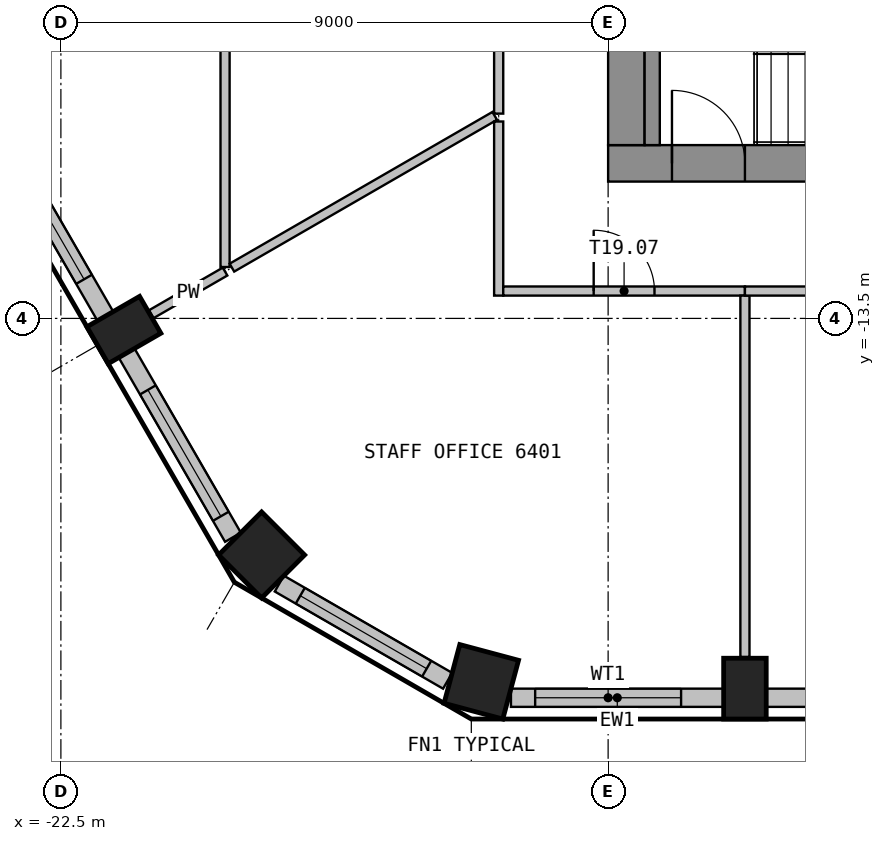
"""IFC4 building model, lengths in metres.
Left out: names, types, materials, properties, quantities, classifications, styles, units other than length and angle.
Written with IfcOpenShell. Run it as: python <this file> out.ifc"""

import sys

from ifc_helpers import new_model, si_unit, direction, frame, frame_2d, origin, origin_2d, place, context, subcontext, project, spatial, rectangle, extrude, element, fill, save


model = new_model("IFC4")
c1 = context("Model", 3, precision=1e-05, world=origin(), true_north=direction((0.0, 1.0)))
c2 = subcontext(c1, "Body", "Model", "MODEL_VIEW")
j1 = project(units=[si_unit("LENGTHUNIT", "METRE"), si_unit("PLANEANGLEUNIT", "RADIAN")], contexts=[c1])
p1 = place(None, origin())
s1 = spatial("IfcSite", under=j1, at=p1, CompositionType="ELEMENT")
p2 = place(p1, origin())
s2 = spatial("IfcBuilding", under=s1, at=p2, CompositionType="ELEMENT")
p3 = place(p2, frame((0.0, 0.0, 258.6)))
s3 = spatial("IfcBuildingStorey", under=s2, at=p3, CompositionType="ELEMENT", Elevation=258.6)
p4 = place(p3, frame((-15.586, -19.476, 0.0), z_axis=(0.0, 0.0, 1.0), x_axis=(0.965925826289, -0.258819045103, 0.0)))
e1 = element("IfcColumn", 1, at=p4, inside=s3, PredefinedType="COLUMN", context=c2, shape_type="SweptSolid", body=[
    extrude(rectangle(XDim=1.0, YDim=1.0, at=origin_2d()), origin(), (0.0, 0.0, 1.0), 3.575),
])
for number, where, z_axis, x_axis in (
    (2, (-11.25, -19.588, 0.0), (0.0, 0.0, 1.0), (1.0, 0.0, 0.0)),
    (3, (-21.464, -13.691, 0.0), (0.0, 0.0, 1.0), (0.5, -0.866, 0.0)),
):
    element("IfcColumn", number, at=place(p3, frame(where, z_axis=z_axis, x_axis=x_axis)), inside=s3, PredefinedType="COLUMN", context=c2, shape_type="SweptSolid", body=[
        extrude(rectangle(XDim=0.7, YDim=1.0, at=origin_2d()), origin(), (0.0, 0.0, 1.0), 3.575),
    ])
p5 = place(p3, frame((-19.199, -17.39, 0.0), z_axis=(0.0, 0.0, 1.0), x_axis=(0.707106781187, -0.707106781187, 0.0)))
e4 = element("IfcColumn", 4, at=p5, inside=s3, PredefinedType="COLUMN", context=c2, shape_type="SweptSolid", body=[
    extrude(rectangle(XDim=1.0, YDim=1.0, at=origin_2d()), origin(), (0.0, 0.0, 1.0), 3.575),
])
p6 = place(p3, frame((-15.098, -19.739, 0.0), z_axis=(0.0, 0.0, 1.0), x_axis=(1.0, 0.0, 0.0)))
e5 = element("IfcWall", 5, at=p6, inside=s3, PredefinedType="SOLIDWALL", context=c2, shape_type="SweptSolid", body=[
    extrude(rectangle(XDim=3.498, YDim=0.3, at=frame_2d((1.749, 0.0))), origin(), (0.0, 0.0, 1.0), 3.575),
])
p7 = place(p6, frame((0.398, 0.0, 0.9)))
e6 = element("IfcOpeningElement", 6, at=p7, cuts=e5, PredefinedType="OPENING", context=c2, shape_type="SweptSolid", body=[
    extrude(rectangle(XDim=2.4, YDim=2.1, at=frame_2d((1.2, 1.05))), frame((0.0, 0.16, 0.0), z_axis=(0.0, -1.0, 0.0), x_axis=(1.0, 0.0, 0.0)), (0.0, 0.0, 1.0), 0.32),
])
p8 = place(p3, frame((-10.899, -19.739, 0.0), z_axis=(0.0, 0.0, 1.0), x_axis=(1.0, 0.0, 0.0)))
e7 = element("IfcWall", 7, at=p8, inside=s3, PredefinedType="SOLIDWALL", context=c2, shape_type="SweptSolid", body=[
    extrude(rectangle(XDim=3.799, YDim=0.3, at=frame_2d((1.899, 0.0))), origin(), (0.0, 0.0, 1.0), 3.575),
])
p9 = place(p8, frame((0.699, 0.0, 0.9)))
e8 = element("IfcOpeningElement", 8, at=p9, cuts=e7, PredefinedType="OPENING", context=c2, shape_type="SweptSolid", body=[
    extrude(rectangle(XDim=2.4, YDim=2.1, at=frame_2d((1.2, 1.05))), frame((0.0, 0.16, 0.0), z_axis=(0.0, -1.0, 0.0), x_axis=(1.0, 0.0, 0.0)), (0.0, 0.0, 1.0), 0.32),
])
p10 = place(p3, frame((-23.669, -10.173, 0.0), z_axis=(0.0, 0.0, 1.0), x_axis=(0.499982058975, -0.866035761792, 0.0)))
e9 = element("IfcWall", 9, at=p10, inside=s3, PredefinedType="SOLIDWALL", context=c2, shape_type="SweptSolid", body=[
    extrude(rectangle(XDim=3.799, YDim=0.3, at=frame_2d((1.899, 0.0))), origin(), (0.0, 0.0, 1.0), 3.575),
])
p11 = place(p10, frame((0.699, 0.0, 0.9)))
e10 = element("IfcOpeningElement", 10, at=p11, cuts=e9, PredefinedType="OPENING", context=c2, shape_type="SweptSolid", body=[
    extrude(rectangle(XDim=2.4, YDim=2.1, at=frame_2d((1.2, 1.05))), frame((0.0, 0.16, 0.0), z_axis=(0.0, -1.0, 0.0), x_axis=(1.0, 0.0, 0.0)), (0.0, 0.0, 1.0), 0.32),
])
p12 = place(p3, frame((-21.419, -14.07, 0.0), z_axis=(0.0, 0.0, 1.0), x_axis=(0.499960102815, -0.866048437209, 0.0)))
e11 = element("IfcWall", 11, at=p12, inside=s3, PredefinedType="SOLIDWALL", context=c2, shape_type="SweptSolid", body=[
    extrude(rectangle(XDim=3.498, YDim=0.3, at=frame_2d((1.749, 0.0))), origin(), (0.0, 0.0, 1.0), 3.575),
])
p13 = place(p12, frame((0.699, 0.0, 0.9)))
e12 = element("IfcOpeningElement", 12, at=p13, cuts=e11, PredefinedType="OPENING", context=c2, shape_type="SweptSolid", body=[
    extrude(rectangle(XDim=2.4, YDim=2.1, at=frame_2d((1.2, 1.05))), frame((0.0, 0.16, 0.0), z_axis=(0.0, -1.0, 0.0), x_axis=(1.0, 0.0, 0.0)), (0.0, 0.0, 1.0), 0.32),
])
p14 = place(p3, frame((-18.908, -17.861, 0.0), z_axis=(0.0, 0.0, 1.0), x_axis=(0.866025316205, -0.500000151692, 0.0)))
e13 = element("IfcWall", 13, at=p14, inside=s3, PredefinedType="SOLIDWALL", context=c2, shape_type="SweptSolid", body=[
    extrude(rectangle(XDim=3.196, YDim=0.3, at=frame_2d((1.598, 0.0))), origin(), (0.0, 0.0, 1.0), 3.575),
])
p15 = place(p14, frame((0.398, 0.0, 0.9)))
e14 = element("IfcOpeningElement", 14, at=p15, cuts=e13, PredefinedType="OPENING", context=c2, shape_type="SweptSolid", body=[
    extrude(rectangle(XDim=2.4, YDim=2.1, at=frame_2d((1.2, 1.05))), frame((0.0, 0.16, 0.0), z_axis=(0.0, -1.0, 0.0), x_axis=(1.0, 0.0, 0.0)), (0.0, 0.0, 1.0), 0.32),
])
p16 = place(p3, frame((-13.5, -10.95, 0.0), z_axis=(0.0, 0.0, 1.0), x_axis=(1.0, 0.0, 0.0)))
e15 = element("IfcWall", 15, at=p16, inside=s3, PredefinedType="SHEAR", context=c2, shape_type="SweptSolid", body=[
    extrude(rectangle(XDim=27.0, YDim=0.6, at=frame_2d((13.5, 0.0))), origin(), (0.0, 0.0, 1.0), 3.575),
])
p17 = place(p16, frame((12.3, 0.0, 0.0)))
e16 = element("IfcOpeningElement", 16, at=p17, cuts=e15, PredefinedType="OPENING", context=c2, shape_type="SweptSolid", body=[
    extrude(rectangle(XDim=2.4, YDim=2.1, at=frame_2d((1.2, 1.05))), frame((0.0, 0.31, 0.0), z_axis=(0.0, -1.0, 0.0), x_axis=(1.0, 0.0, 0.0)), (0.0, 0.0, 1.0), 0.62),
])
p18 = place(p16, frame((1.05, 0.0, 0.0)))
e17 = element("IfcOpeningElement", 17, at=p18, cuts=e15, PredefinedType="OPENING", context=c2, shape_type="SweptSolid", body=[
    extrude(rectangle(XDim=1.2, YDim=2.1, at=frame_2d((0.6, 1.05))), frame((0.0, 0.31, 0.0), z_axis=(0.0, -1.0, 0.0), x_axis=(1.0, 0.0, 0.0)), (0.0, 0.0, 1.0), 0.62),
])
p19 = place(p16, frame((24.75, 0.0, 0.0)))
e18 = element("IfcOpeningElement", 18, at=p19, cuts=e15, PredefinedType="OPENING", context=c2, shape_type="SweptSolid", body=[
    extrude(rectangle(XDim=1.2, YDim=2.1, at=frame_2d((0.6, 1.05))), frame((0.0, 0.31, 0.0), z_axis=(0.0, -1.0, 0.0), x_axis=(1.0, 0.0, 0.0)), (0.0, 0.0, 1.0), 0.62),
])
p20 = place(p3, frame((-13.2, -10.65, 0.0), z_axis=(0.0, 0.0, 1.0), x_axis=(0.0, 1.0, 0.0)))
e19 = element("IfcWall", 19, at=p20, inside=s3, PredefinedType="SHEAR", context=c2, shape_type="SweptSolid", body=[
    extrude(rectangle(XDim=21.3, YDim=0.6, at=frame_2d((10.65, 0.0))), origin(), (0.0, 0.0, 1.0), 3.575),
])
p21 = place(p20, frame((9.45, 0.0, 0.0)))
e20 = element("IfcOpeningElement", 20, at=p21, cuts=e19, PredefinedType="OPENING", context=c2, shape_type="SweptSolid", body=[
    extrude(rectangle(XDim=2.4, YDim=2.1, at=frame_2d((1.2, 1.05))), frame((0.0, 0.31, 0.0), z_axis=(0.0, -1.0, 0.0), x_axis=(1.0, 0.0, 0.0)), (0.0, 0.0, 1.0), 0.62),
])
p22 = place(p3, frame((-12.775, -10.65, 0.0), z_axis=(0.0, 0.0, 1.0), x_axis=(0.0, 1.0, 0.0)))
e21 = element("IfcWall", 21, at=p22, inside=s3, PredefinedType="SHEAR", context=c2, shape_type="SweptSolid", body=[
    extrude(rectangle(XDim=3.25, YDim=0.25, at=frame_2d((1.625, 0.0))), origin(), (0.0, 0.0, 1.0), 3.575),
])
p23 = place(p3, frame((-19.8, -12.73, 0.0), z_axis=(0.0, 0.0, 1.0), x_axis=(-0.865918715181, -0.500184744569, 0.0)))
e22 = element("IfcWall", 22, at=p23, inside=s3, PredefinedType="PARTITIONING", context=c2, shape_type="SweptSolid", body=[
    extrude(rectangle(XDim=1.402, YDim=0.15, at=frame_2d((0.701, 0.0))), origin(), (0.0, 0.0, 1.0), 3.575),
])
p24 = place(p3, frame((-19.8, -2.325, 0.0), z_axis=(0.0, 0.0, 1.0), x_axis=(0.0, -1.0, 0.0)))
e23 = element("IfcWall", 23, at=p24, inside=s3, PredefinedType="PARTITIONING", context=c2, shape_type="SweptSolid", body=[
    extrude(rectangle(XDim=10.33, YDim=0.15, at=frame_2d((5.165, 0.0))), origin(), (0.0, 0.0, 1.0), 3.575),
])
p25 = place(p3, frame((-15.365, -10.169, 0.0), z_axis=(0.0, 0.0, 1.0), x_axis=(-0.866025118187, -0.500000494669, 0.0)))
e24 = element("IfcWall", 24, at=p25, inside=s3, PredefinedType="PARTITIONING", context=c2, shape_type="SweptSolid", body=[
    extrude(rectangle(XDim=4.991, YDim=0.15, at=frame_2d((2.496, 0.0))), origin(), (0.0, 0.0, 1.0), 3.575),
])
p26 = place(p3, frame((-15.3, -10.262, 0.0), z_axis=(0.0, 0.0, 1.0), x_axis=(0.0, -1.0, 0.0)))
e25 = element("IfcWall", 25, at=p26, inside=s3, PredefinedType="PARTITIONING", context=c2, shape_type="SweptSolid", body=[
    extrude(rectangle(XDim=2.863, YDim=0.15, at=frame_2d((1.432, 0.0))), origin(), (0.0, 0.0, 1.0), 3.575),
])
p27 = place(p3, frame((-15.225, -13.05, 0.0), z_axis=(0.0, 0.0, 1.0), x_axis=(1.0, 0.0, 0.0)))
e26 = element("IfcWall", 26, at=p27, inside=s3, PredefinedType="PARTITIONING", context=c2, shape_type="SweptSolid", body=[
    extrude(rectangle(XDim=3.975, YDim=0.15, at=frame_2d((1.988, 0.0))), origin(), (0.0, 0.0, 1.0), 3.575),
])
p28 = place(p27, frame((1.488, 0.0, 0.0)))
e27 = element("IfcOpeningElement", 27, at=p28, cuts=e26, PredefinedType="OPENING", context=c2, shape_type="SweptSolid", body=[
    extrude(rectangle(XDim=1.0, YDim=2.1, at=frame_2d((0.5, 1.05))), frame((0.0, 0.085, 0.0), z_axis=(0.0, -1.0, 0.0), x_axis=(1.0, 0.0, 0.0)), (0.0, 0.0, 1.0), 0.17),
])
p29 = place(p3, frame((-15.3, -2.325, 0.0), z_axis=(0.0, 0.0, 1.0), x_axis=(0.0, -1.0, 0.0)))
e28 = element("IfcWall", 28, at=p29, inside=s3, PredefinedType="PARTITIONING", context=c2, shape_type="SweptSolid", body=[
    extrude(rectangle(XDim=7.807, YDim=0.15, at=frame_2d((3.904, 0.0))), origin(), (0.0, 0.0, 1.0), 3.575),
])
p30 = place(p29, frame((3.404, 0.0, 0.0)))
e29 = element("IfcOpeningElement", 29, at=p30, cuts=e28, PredefinedType="OPENING", context=c2, shape_type="SweptSolid", body=[
    extrude(rectangle(XDim=1.0, YDim=2.1, at=frame_2d((0.5, 1.05))), frame((0.0, 0.085, 0.0), z_axis=(0.0, -1.0, 0.0), x_axis=(1.0, 0.0, 0.0)), (0.0, 0.0, 1.0), 0.17),
])
p31 = place(p3, frame((-11.25, -13.125, 0.0), z_axis=(0.0, 0.0, 1.0), x_axis=(0.0, -1.0, 0.0)))
e30 = element("IfcWall", 30, at=p31, inside=s3, PredefinedType="PARTITIONING", context=c2, shape_type="SweptSolid", body=[
    extrude(rectangle(XDim=5.944, YDim=0.15, at=frame_2d((2.972, 0.0))), origin(), (0.0, 0.0, 1.0), 3.575),
])
p32 = place(p3, frame((-11.25, -13.05, 0.0), z_axis=(0.0, 0.0, 1.0), x_axis=(1.0, 0.0, 0.0)))
e31 = element("IfcWall", 31, at=p32, inside=s3, PredefinedType="PARTITIONING", context=c2, shape_type="SweptSolid", body=[
    extrude(rectangle(XDim=13.5, YDim=0.15, at=frame_2d((6.75, 0.0))), origin(), (0.0, 0.0, 1.0), 3.575),
])
p33 = place(p32, frame((6.25, 0.0, 0.0)))
e32 = element("IfcOpeningElement", 32, at=p33, cuts=e31, PredefinedType="OPENING", context=c2, shape_type="SweptSolid", body=[
    extrude(rectangle(XDim=1.0, YDim=2.1, at=frame_2d((0.5, 1.05))), frame((0.0, 0.085, 0.0), z_axis=(0.0, -1.0, 0.0), x_axis=(1.0, 0.0, 0.0)), (0.0, 0.0, 1.0), 0.17),
])
p34 = place(p7, origin())
e33 = element("IfcWindow", 33, at=p34, inside=s3, PartitioningType="SINGLE_PANEL", PredefinedType="WINDOW", context=c2, shape_type="SweptSolid", body=[
    extrude(rectangle(XDim=2.4, YDim=2.1, at=frame_2d((1.2, 1.05))), frame((0.0, 0.03, 0.0), z_axis=(0.0, -1.0, 0.0), x_axis=(1.0, 0.0, 0.0)), (0.0, 0.0, 1.0), 0.06),
])
fill(e6, e33)
p35 = place(p11, origin())
e34 = element("IfcWindow", 34, at=p35, inside=s3, PartitioningType="SINGLE_PANEL", PredefinedType="WINDOW", context=c2, shape_type="SweptSolid", body=[
    extrude(rectangle(XDim=2.4, YDim=2.1, at=frame_2d((1.2, 1.05))), frame((0.0, 0.03, 0.0), z_axis=(0.0, -1.0, 0.0), x_axis=(1.0, 0.0, 0.0)), (0.0, 0.0, 1.0), 0.06),
])
fill(e10, e34)
p36 = place(p13, origin())
e35 = element("IfcWindow", 35, at=p36, inside=s3, PartitioningType="SINGLE_PANEL", PredefinedType="WINDOW", context=c2, shape_type="SweptSolid", body=[
    extrude(rectangle(XDim=2.4, YDim=2.1, at=frame_2d((1.2, 1.05))), frame((0.0, 0.03, 0.0), z_axis=(0.0, -1.0, 0.0), x_axis=(1.0, 0.0, 0.0)), (0.0, 0.0, 1.0), 0.06),
])
fill(e12, e35)
p37 = place(p15, origin())
e36 = element("IfcWindow", 36, at=p37, inside=s3, PartitioningType="SINGLE_PANEL", PredefinedType="WINDOW", context=c2, shape_type="SweptSolid", body=[
    extrude(rectangle(XDim=2.4, YDim=2.1, at=frame_2d((1.2, 1.05))), frame((0.0, 0.03, 0.0), z_axis=(0.0, -1.0, 0.0), x_axis=(1.0, 0.0, 0.0)), (0.0, 0.0, 1.0), 0.06),
])
fill(e14, e36)
p38 = place(p18, origin())
e37 = element("IfcDoor", 37, at=p38, inside=s3, OperationType="SINGLE_SWING_RIGHT", PredefinedType="DOOR", context=c2, shape_type="SweptSolid", body=[
    extrude(rectangle(XDim=1.2, YDim=2.1, at=frame_2d((0.6, 1.05))), frame((0.0, 0.025, 0.0), z_axis=(0.0, -1.0, 0.0), x_axis=(1.0, 0.0, 0.0)), (0.0, 0.0, 1.0), 0.05),
])
fill(e17, e37)
p39 = place(p28, origin())
e38 = element("IfcDoor", 38, at=p39, inside=s3, OperationType="SINGLE_SWING_RIGHT", PredefinedType="DOOR", context=c2, shape_type="SweptSolid", body=[
    extrude(rectangle(XDim=1.0, YDim=2.1, at=frame_2d((0.5, 1.05))), frame((0.0, 0.025, 0.0), z_axis=(0.0, -1.0, 0.0), x_axis=(1.0, 0.0, 0.0)), (0.0, 0.0, 1.0), 0.05),
])
fill(e27, e38)
save(model, sys.argv[1])
